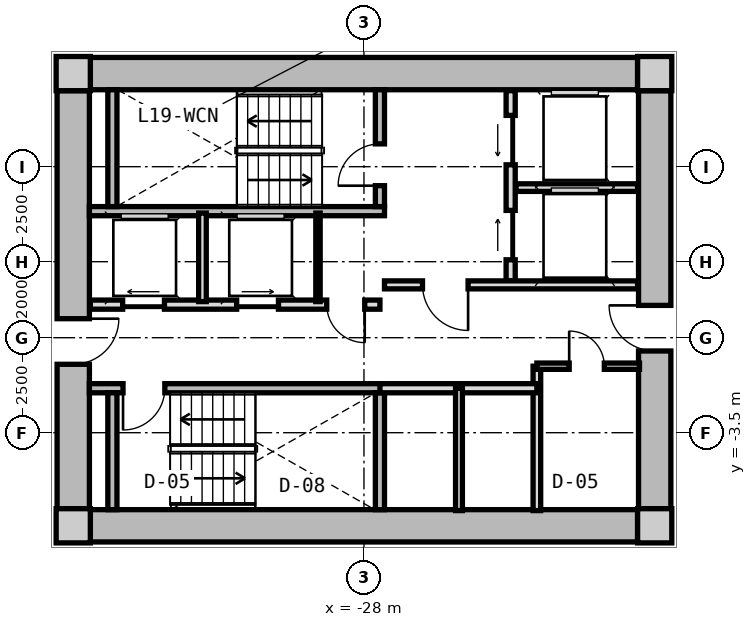
"""IFC4 building model, lengths in metres.
Left out: names, types, materials, properties, quantities, classifications, styles, units other than length and angle.
Written with IfcOpenShell. Run it as: python <this file> out.ifc"""

import sys

from ifc_helpers import new_model, si_unit, direction, frame, frame_2d, origin, origin_2d, place, context, subcontext, project, spatial, rectangle, extrude, source, transform, mapped, element, fill, save


model = new_model("IFC4")
c1 = context("Model", 3, precision=1e-05, world=origin(), true_north=direction((0.0, 1.0)))
c2 = subcontext(c1, "Body", "Model", "MODEL_VIEW")
j1 = project(units=[si_unit("LENGTHUNIT", "METRE"), si_unit("PLANEANGLEUNIT", "RADIAN")], contexts=[c1])
p1 = place(None, origin())
s1 = spatial("IfcSite", under=j1, at=p1, CompositionType="ELEMENT")
p2 = place(p1, origin())
s2 = spatial("IfcBuilding", under=s1, at=p2, CompositionType="ELEMENT")
p3 = place(p2, frame((0.0, 0.0, 64.3)))
s3 = spatial("IfcBuildingStorey", under=s2, at=p3, CompositionType="ELEMENT", Elevation=64.3)
m1 = source(origin(), c2, "Body", "SweptSolid", [
    extrude(rectangle(XDim=0.9, YDim=0.9, at=origin_2d()), origin(), (0.0, 0.0, 1.0), 3.05),
])
for number, where, z_axis, x_axis in (
    (1, (-35.65, -5.95, 0.0), (0.0, 0.0, 1.0), (1.0, 0.0, 0.0)),
    (2, (-20.35, -5.95, 0.0), (0.0, 0.0, 1.0), (1.0, 0.0, 0.0)),
    (3, (-20.35, 5.95, 0.0), (0.0, 0.0, 1.0), (1.0, 0.0, 0.0)),
    (4, (-35.65, 5.95, 0.0), (0.0, 0.0, 1.0), (1.0, 0.0, 0.0)),
):
    element("IfcColumn", number, at=place(p3, frame(where, z_axis=z_axis, x_axis=x_axis)), inside=s3, PredefinedType="COLUMN", context=c2, shape_type="MappedRepresentation", body=[
        mapped(m1, transform((0.0, 0.0, 0.0), x_axis=(1.0, 0.0, 0.0), y_axis=(0.0, 1.0, 0.0), z_axis=(0.0, 0.0, 1.0), scale=1.0)),
    ])
m2 = source(origin(), c2, "Body", "SweptSolid", [
    extrude(rectangle(XDim=14.4, YDim=0.85, at=frame_2d((7.2, 0.0))), origin(), (0.0, 0.0, 1.0), 2.79),
])
for number, where, z_axis, x_axis in (
    (5, (-35.2, 5.95, 0.0), (0.0, 0.0, 1.0), (1.0, 0.0, 0.0)),
    (6, (-20.8, -5.95, 0.0), (0.0, 0.0, 1.0), (-1.0, 0.0, 0.0)),
):
    element("IfcWall", number, at=place(p3, frame(where, z_axis=z_axis, x_axis=x_axis)), inside=s3, PredefinedType="SHEAR", context=c2, shape_type="MappedRepresentation", body=[
        mapped(m2, transform((0.0, 0.0, 0.0), x_axis=(1.0, 0.0, 0.0), y_axis=(0.0, 1.0, 0.0), z_axis=(0.0, 0.0, 1.0), scale=1.0)),
    ])
m3 = source(origin(), c2, "Body", "SweptSolid", [
    extrude(rectangle(XDim=11.0, YDim=0.85, at=frame_2d((5.5, 0.0))), origin(), (0.0, 0.0, 1.0), 2.79),
])
p4 = place(p3, frame((-35.65, -5.5, 0.0), z_axis=(0.0, 0.0, 1.0), x_axis=(0.0, 1.0, 0.0)))
e7 = element("IfcWall", 7, at=p4, inside=s3, PredefinedType="SHEAR", context=c2, shape_type="MappedRepresentation", body=[
    mapped(m3, transform((0.0, 0.0, 0.0), x_axis=(1.0, 0.0, 0.0), y_axis=(0.0, 1.0, 0.0), z_axis=(0.0, 0.0, 1.0), scale=1.0)),
])
p5 = place(p4, frame((3.8, 0.0, 0.0)))
e8 = element("IfcOpeningElement", 8, at=p5, cuts=e7, PredefinedType="OPENING", context=c2, shape_type="SweptSolid", body=[
    extrude(rectangle(XDim=1.2, YDim=2.15, at=frame_2d((0.6, 1.075))), frame((0.0, 0.435, 0.0), z_axis=(0.0, -1.0, 0.0), x_axis=(1.0, 0.0, 0.0)), (0.0, 0.0, 1.0), 0.87),
])
p6 = place(p3, frame((-20.35, 5.5, 0.0), z_axis=(0.0, 0.0, 1.0), x_axis=(0.0, -1.0, 0.0)))
e9 = element("IfcWall", 9, at=p6, inside=s3, PredefinedType="SHEAR", context=c2, shape_type="MappedRepresentation", body=[
    mapped(m3, transform((0.0, 0.0, 0.0), x_axis=(1.0, 0.0, 0.0), y_axis=(0.0, 1.0, 0.0), z_axis=(0.0, 0.0, 1.0), scale=1.0)),
])
p7 = place(p6, frame((5.65, 0.0, 0.0)))
e10 = element("IfcOpeningElement", 10, at=p7, cuts=e9, PredefinedType="OPENING", context=c2, shape_type="SweptSolid", body=[
    extrude(rectangle(XDim=1.2, YDim=2.15, at=frame_2d((0.6, 1.075))), frame((0.0, 0.435, 0.0), z_axis=(0.0, -1.0, 0.0), x_axis=(1.0, 0.0, 0.0)), (0.0, 0.0, 1.0), 0.87),
])
m4 = source(origin(), c2, "Body", "SweptSolid", [
    extrude(rectangle(XDim=7.765, YDim=0.24, at=frame_2d((3.883, 0.0))), origin(), (0.0, 0.0, 1.0), 2.79),
])
p8 = place(p3, frame((-35.225, 2.33, 0.0), z_axis=(0.0, 0.0, 1.0), x_axis=(1.0, 0.0, 0.0)))
e11 = element("IfcWall", 11, at=p8, inside=s3, PredefinedType="PARTITIONING", context=c2, shape_type="MappedRepresentation", body=[
    mapped(m4, transform((0.0, 0.0, 0.0), x_axis=(1.0, 0.0, 0.0), y_axis=(0.0, 1.0, 0.0), z_axis=(0.0, 0.0, 1.0), scale=1.0)),
])
m5 = source(origin(), c2, "Body", "SweptSolid", [
    extrude(rectangle(XDim=3.075, YDim=0.24, at=frame_2d((1.538, 0.0))), origin(), (0.0, 0.0, 1.0), 2.79),
])
p9 = place(p3, frame((-34.62, 2.45, 0.0), z_axis=(0.0, 0.0, 1.0), x_axis=(0.0, 1.0, 0.0)))
e12 = element("IfcWall", 12, at=p9, inside=s3, PredefinedType="PARTITIONING", context=c2, shape_type="MappedRepresentation", body=[
    mapped(m5, transform((0.0, 0.0, 0.0), x_axis=(1.0, 0.0, 0.0), y_axis=(0.0, 1.0, 0.0), z_axis=(0.0, 0.0, 1.0), scale=1.0)),
])
p10 = place(p3, frame((-27.58, 2.45, 0.0), z_axis=(0.0, 0.0, 1.0), x_axis=(0.0, 1.0, 0.0)))
e13 = element("IfcWall", 13, at=p10, inside=s3, PredefinedType="PARTITIONING", context=c2, shape_type="MappedRepresentation", body=[
    mapped(m5, transform((0.0, 0.0, 0.0), x_axis=(1.0, 0.0, 0.0), y_axis=(0.0, 1.0, 0.0), z_axis=(0.0, 0.0, 1.0), scale=1.0)),
])
p11 = place(p10, frame((0.55, 0.0, 0.0)))
e14 = element("IfcOpeningElement", 14, at=p11, cuts=e13, PredefinedType="OPENING", context=c2, shape_type="SweptSolid", body=[
    extrude(rectangle(XDim=1.1, YDim=2.15, at=frame_2d((0.55, 1.075))), frame((0.0, 0.13, 0.0), z_axis=(0.0, -1.0, 0.0), x_axis=(1.0, 0.0, 0.0)), (0.0, 0.0, 1.0), 0.26),
])
p12 = place(p3, frame((-35.225, -2.33, 0.0), z_axis=(0.0, 0.0, 1.0), x_axis=(1.0, 0.0, 0.0)))
e15 = element("IfcWall", 15, at=p12, inside=s3, PredefinedType="PARTITIONING", context=c2, shape_type="MappedRepresentation", body=[
    mapped(m4, transform((0.0, 0.0, 0.0), x_axis=(1.0, 0.0, 0.0), y_axis=(0.0, 1.0, 0.0), z_axis=(0.0, 0.0, 1.0), scale=1.0)),
])
p13 = place(p12, frame((0.885, 0.0, 0.0)))
e16 = element("IfcOpeningElement", 16, at=p13, cuts=e15, PredefinedType="OPENING", context=c2, shape_type="SweptSolid", body=[
    extrude(rectangle(XDim=1.1, YDim=2.15, at=frame_2d((0.55, 1.075))), frame((0.0, 0.13, 0.0), z_axis=(0.0, -1.0, 0.0), x_axis=(1.0, 0.0, 0.0)), (0.0, 0.0, 1.0), 0.26),
])
for number, where, z_axis, x_axis in (
    (17, (-34.62, -5.525, 0.0), (0.0, 0.0, 1.0), (0.0, 1.0, 0.0)),
    (18, (-27.58, -5.525, 0.0), (0.0, 0.0, 1.0), (0.0, 1.0, 0.0)),
):
    element("IfcWall", number, at=place(p3, frame(where, z_axis=z_axis, x_axis=x_axis)), inside=s3, PredefinedType="PARTITIONING", context=c2, shape_type="MappedRepresentation", body=[
        mapped(m5, transform((0.0, 0.0, 0.0), x_axis=(1.0, 0.0, 0.0), y_axis=(0.0, 1.0, 0.0), z_axis=(0.0, 0.0, 1.0), scale=1.0)),
    ])
m6 = source(origin(), c2, "Body", "SweptSolid", [
    extrude(rectangle(XDim=5.0, YDim=0.24, at=frame_2d((2.5, 0.0))), origin(), (0.0, 0.0, 1.0), 2.775),
])
p14 = place(p3, frame((-24.14, 0.5, 0.0), z_axis=(0.0, 0.0, 1.0), x_axis=(0.0, 1.0, 0.0)))
e19 = element("IfcWall", 19, at=p14, inside=s3, PredefinedType="PARTITIONING", context=c2, shape_type="MappedRepresentation", body=[
    mapped(m6, transform((0.0, 0.0, 0.0), x_axis=(1.0, 0.0, 0.0), y_axis=(0.0, 1.0, 0.0), z_axis=(0.0, 0.0, 1.0), scale=1.0)),
])
p15 = place(p14, frame((3.05, 0.0, 0.0)))
e20 = element("IfcOpeningElement", 20, at=p15, cuts=e19, PredefinedType="OPENING", context=c2, shape_type="SweptSolid", body=[
    extrude(rectangle(XDim=1.3, YDim=2.2, at=frame_2d((0.65, 1.1))), frame((0.0, 0.13, 0.0), z_axis=(0.0, -1.0, 0.0), x_axis=(1.0, 0.0, 0.0)), (0.0, 0.0, 1.0), 0.26),
])
p16 = place(p14, frame((0.55, 0.0, 0.0)))
e21 = element("IfcOpeningElement", 21, at=p16, cuts=e19, PredefinedType="OPENING", context=c2, shape_type="SweptSolid", body=[
    extrude(rectangle(XDim=1.3, YDim=2.2, at=frame_2d((0.65, 1.1))), frame((0.0, 0.13, 0.0), z_axis=(0.0, -1.0, 0.0), x_axis=(1.0, 0.0, 0.0)), (0.0, 0.0, 1.0), 0.26),
])
m7 = source(origin(), c2, "Body", "SweptSolid", [
    extrude(rectangle(XDim=3.2, YDim=0.2, at=frame_2d((1.6, 0.0))), origin(), (0.0, 0.0, 1.0), 2.775),
])
p17 = place(p3, frame((-24.0, 2.95, 0.0), z_axis=(0.0, 0.0, 1.0), x_axis=(1.0, 0.0, 0.0)))
e22 = element("IfcWall", 22, at=p17, inside=s3, PredefinedType="PARTITIONING", context=c2, shape_type="MappedRepresentation", body=[
    mapped(m7, transform((0.0, 0.0, 0.0), x_axis=(1.0, 0.0, 0.0), y_axis=(0.0, 1.0, 0.0), z_axis=(0.0, 0.0, 1.0), scale=1.0)),
])
m8 = source(origin(), c2, "Body", "SweptSolid", [
    extrude(rectangle(XDim=6.66, YDim=0.21, at=frame_2d((3.33, 0.0))), origin(), (0.0, 0.0, 1.0), 2.775),
])
p18 = place(p3, frame((-27.46, 0.39, 0.0), z_axis=(0.0, 0.0, 1.0), x_axis=(1.0, 0.0, 0.0)))
e23 = element("IfcWall", 23, at=p18, inside=s3, PredefinedType="PARTITIONING", context=c2, shape_type="MappedRepresentation", body=[
    mapped(m8, transform((0.0, 0.0, 0.0), x_axis=(1.0, 0.0, 0.0), y_axis=(0.0, 1.0, 0.0), z_axis=(0.0, 0.0, 1.0), scale=1.0)),
])
p19 = place(p18, frame((1.0, 0.0, 0.0)))
e24 = element("IfcOpeningElement", 24, at=p19, cuts=e23, PredefinedType="OPENING", context=c2, shape_type="SweptSolid", body=[
    extrude(rectangle(XDim=1.2, YDim=2.15, at=frame_2d((0.6, 1.075))), frame((0.0, 0.115, 0.0), z_axis=(0.0, -1.0, 0.0), x_axis=(1.0, 0.0, 0.0)), (0.0, 0.0, 1.0), 0.23),
])
m9 = source(origin(), c2, "Body", "SweptSolid", [
    extrude(rectangle(XDim=7.62, YDim=0.24, at=frame_2d((3.81, 0.0))), origin(), (0.0, 0.0, 1.0), 2.775),
])
p20 = place(p3, frame((-35.2, -0.13, 0.0), z_axis=(0.0, 0.0, 1.0), x_axis=(1.0, 0.0, 0.0)))
e25 = element("IfcWall", 25, at=p20, inside=s3, PredefinedType="PARTITIONING", context=c2, shape_type="MappedRepresentation", body=[
    mapped(m9, transform((0.0, 0.0, 0.0), x_axis=(1.0, 0.0, 0.0), y_axis=(0.0, 1.0, 0.0), z_axis=(0.0, 0.0, 1.0), scale=1.0)),
])
p21 = place(p20, frame((6.22, 0.0, 0.0)))
e26 = element("IfcOpeningElement", 26, at=p21, cuts=e25, PredefinedType="OPENING", context=c2, shape_type="SweptSolid", body=[
    extrude(rectangle(XDim=1.0, YDim=2.1, at=frame_2d((0.5, 1.05))), frame((0.0, 0.13, 0.0), z_axis=(0.0, -1.0, 0.0), x_axis=(1.0, 0.0, 0.0)), (0.0, 0.0, 1.0), 0.26),
])
p22 = place(p20, frame((0.85, 0.0, 0.0)))
e27 = element("IfcOpeningElement", 27, at=p22, cuts=e25, PredefinedType="OPENING", context=c2, shape_type="SweptSolid", body=[
    extrude(rectangle(XDim=1.1, YDim=2.2, at=frame_2d((0.55, 1.1))), frame((0.0, 0.13, 0.0), z_axis=(0.0, -1.0, 0.0), x_axis=(1.0, 0.0, 0.0)), (0.0, 0.0, 1.0), 0.26),
])
p23 = place(p20, frame((3.85, 0.0, 0.0)))
e28 = element("IfcOpeningElement", 28, at=p23, cuts=e25, PredefinedType="OPENING", context=c2, shape_type="SweptSolid", body=[
    extrude(rectangle(XDim=1.1, YDim=2.2, at=frame_2d((0.55, 1.1))), frame((0.0, 0.13, 0.0), z_axis=(0.0, -1.0, 0.0), x_axis=(1.0, 0.0, 0.0)), (0.0, 0.0, 1.0), 0.26),
])
m10 = source(origin(), c2, "Body", "SweptSolid", [
    extrude(rectangle(XDim=2.33, YDim=0.115, at=frame_2d((1.165, 0.0))), origin(), (0.0, 0.0, 1.0), 2.775),
])
p24 = place(p3, frame((-29.21, -0.05, 0.0), z_axis=(0.0, 0.0, 1.0), x_axis=(0.0, 1.0, 0.0)))
e29 = element("IfcWall", 29, at=p24, inside=s3, PredefinedType="PARTITIONING", context=c2, shape_type="MappedRepresentation", body=[
    mapped(m10, transform((0.0, 0.0, 0.0), x_axis=(1.0, 0.0, 0.0), y_axis=(0.0, 1.0, 0.0), z_axis=(0.0, 0.0, 1.0), scale=1.0)),
])
m11 = source(origin(), c2, "Body", "SweptSolid", [
    extrude(rectangle(XDim=2.33, YDim=0.2, at=frame_2d((1.165, 0.0))), origin(), (0.0, 0.0, 1.0), 2.775),
])
p25 = place(p3, frame((-32.25, -0.05, 0.0), z_axis=(0.0, 0.0, 1.0), x_axis=(0.0, 1.0, 0.0)))
e30 = element("IfcWall", 30, at=p25, inside=s3, PredefinedType="PARTITIONING", context=c2, shape_type="MappedRepresentation", body=[
    mapped(m11, transform((0.0, 0.0, 0.0), x_axis=(1.0, 0.0, 0.0), y_axis=(0.0, 1.0, 0.0), z_axis=(0.0, 0.0, 1.0), scale=1.0)),
])
m12 = source(origin(), c2, "Body", "SweptSolid", [
    extrude(rectangle(XDim=3.8, YDim=0.2, at=frame_2d((1.9, 0.0))), origin(), (0.0, 0.0, 1.0), 2.775),
])
p26 = place(p3, frame((-23.45, -5.55, 0.0), z_axis=(0.0, 0.0, 1.0), x_axis=(0.0, 1.0, 0.0)))
e31 = element("IfcWall", 31, at=p26, inside=s3, PredefinedType="PARTITIONING", context=c2, shape_type="MappedRepresentation", body=[
    mapped(m12, transform((0.0, 0.0, 0.0), x_axis=(1.0, 0.0, 0.0), y_axis=(0.0, 1.0, 0.0), z_axis=(0.0, 0.0, 1.0), scale=1.0)),
])
m13 = source(origin(), c2, "Body", "SweptSolid", [
    extrude(rectangle(XDim=4.13, YDim=0.24, at=frame_2d((2.065, 0.0))), origin(), (0.0, 0.0, 1.0), 2.775),
])
p27 = place(p3, frame((-27.58, -2.33, 0.0), z_axis=(0.0, 0.0, 1.0), x_axis=(1.0, 0.0, 0.0)))
e32 = element("IfcWall", 32, at=p27, inside=s3, PredefinedType="PARTITIONING", context=c2, shape_type="MappedRepresentation", body=[
    mapped(m13, transform((0.0, 0.0, 0.0), x_axis=(1.0, 0.0, 0.0), y_axis=(0.0, 1.0, 0.0), z_axis=(0.0, 0.0, 1.0), scale=1.0)),
])
m14 = source(origin(), c2, "Body", "SweptSolid", [
    extrude(rectangle(XDim=3.22, YDim=0.18, at=frame_2d((1.61, 0.0))), origin(), (0.0, 0.0, 1.0), 2.775),
])
p28 = place(p3, frame((-25.5, -5.55, 0.0), z_axis=(0.0, 0.0, 1.0), x_axis=(0.0, 1.0, 0.0)))
e33 = element("IfcWall", 33, at=p28, inside=s3, PredefinedType="PARTITIONING", context=c2, shape_type="MappedRepresentation", body=[
    mapped(m14, transform((0.0, 0.0, 0.0), x_axis=(1.0, 0.0, 0.0), y_axis=(0.0, 1.0, 0.0), z_axis=(0.0, 0.0, 1.0), scale=1.0)),
])
m15 = source(origin(), c2, "Body", "SweptSolid", [
    extrude(rectangle(XDim=2.7, YDim=0.165, at=frame_2d((1.35, 0.0))), origin(), (0.0, 0.0, 1.0), 2.775),
])
p29 = place(p3, frame((-23.45, -1.75, 0.0), z_axis=(0.0, 0.0, 1.0), x_axis=(1.0, 0.0, 0.0)))
e34 = element("IfcWall", 34, at=p29, inside=s3, PredefinedType="PARTITIONING", context=c2, shape_type="MappedRepresentation", body=[
    mapped(m15, transform((0.0, 0.0, 0.0), x_axis=(1.0, 0.0, 0.0), y_axis=(0.0, 1.0, 0.0), z_axis=(0.0, 0.0, 1.0), scale=1.0)),
])
p30 = place(p29, frame((0.85, 0.0, 0.0)))
e35 = element("IfcOpeningElement", 35, at=p30, cuts=e34, PredefinedType="OPENING", context=c2, shape_type="SweptSolid", body=[
    extrude(rectangle(XDim=0.925, YDim=2.1, at=frame_2d((0.462, 1.05))), frame((0.0, 0.093, 0.0), z_axis=(0.0, -1.0, 0.0), x_axis=(1.0, 0.0, 0.0)), (0.0, 0.0, 1.0), 0.185),
])
m16 = source(origin(), c2, "Body", "SweptSolid", [
    extrude(rectangle(XDim=1.1, YDim=2.15, at=frame_2d((0.55, 1.075))), frame((0.0, 0.025, 0.0), z_axis=(0.0, -1.0, 0.0), x_axis=(1.0, 0.0, 0.0)), (0.0, 0.0, 1.0), 0.05),
])
p31 = place(p11, origin())
e36 = element("IfcDoor", 36, at=p31, inside=s3, OperationType="SINGLE_SWING_LEFT", PredefinedType="DOOR", context=c2, shape_type="MappedRepresentation", body=[
    mapped(m16, transform((0.0, 0.0, 0.0), x_axis=(1.0, 0.0, 0.0), y_axis=(0.0, 1.0, 0.0), z_axis=(0.0, 0.0, 1.0), scale=1.0)),
])
fill(e14, e36)
p32 = place(p13, frame((1.1, 0.0, 0.0), z_axis=(0.0, 0.0, 1.0), x_axis=(-1.0, 0.0, 0.0)))
e37 = element("IfcDoor", 37, at=p32, inside=s3, OperationType="SINGLE_SWING_RIGHT", PredefinedType="DOOR", context=c2, shape_type="MappedRepresentation", body=[
    mapped(m16, transform((0.0, 0.0, 0.0), x_axis=(1.0, 0.0, 0.0), y_axis=(0.0, 1.0, 0.0), z_axis=(0.0, 0.0, 1.0), scale=1.0)),
])
fill(e16, e37)
m17 = source(origin(), c2, "Body", "SweptSolid", [
    extrude(rectangle(XDim=1.3, YDim=2.2, at=frame_2d((0.65, 1.1))), frame((0.0, 0.025, 0.0), z_axis=(0.0, -1.0, 0.0), x_axis=(1.0, 0.0, 0.0)), (0.0, 0.0, 1.0), 0.05),
])
p33 = place(p15, origin())
e38 = element("IfcDoor", 38, at=p33, inside=s3, OperationType="SLIDING_TO_LEFT", PredefinedType="DOOR", context=c2, shape_type="MappedRepresentation", body=[
    mapped(m17, transform((0.0, 0.0, 0.0), x_axis=(1.0, 0.0, 0.0), y_axis=(0.0, 1.0, 0.0), z_axis=(0.0, 0.0, 1.0), scale=1.0)),
])
fill(e20, e38)
p34 = place(p16, origin())
e39 = element("IfcDoor", 39, at=p34, inside=s3, OperationType="SLIDING_TO_RIGHT", PredefinedType="DOOR", context=c2, shape_type="MappedRepresentation", body=[
    mapped(m17, transform((0.0, 0.0, 0.0), x_axis=(1.0, 0.0, 0.0), y_axis=(0.0, 1.0, 0.0), z_axis=(0.0, 0.0, 1.0), scale=1.0)),
])
fill(e21, e39)
m18 = source(origin(), c2, "Body", "SweptSolid", [
    extrude(rectangle(XDim=1.2, YDim=2.15, at=frame_2d((0.6, 1.075))), frame((0.0, 0.025, 0.0), z_axis=(0.0, -1.0, 0.0), x_axis=(1.0, 0.0, 0.0)), (0.0, 0.0, 1.0), 0.05),
])
p35 = place(p19, frame((1.2, 0.0, 0.0), z_axis=(0.0, 0.0, 1.0), x_axis=(-1.0, 0.0, 0.0)))
e40 = element("IfcDoor", 40, at=p35, inside=s3, OperationType="SINGLE_SWING_LEFT", PredefinedType="DOOR", context=c2, shape_type="MappedRepresentation", body=[
    mapped(m18, transform((0.0, 0.0, 0.0), x_axis=(1.0, 0.0, 0.0), y_axis=(0.0, 1.0, 0.0), z_axis=(0.0, 0.0, 1.0), scale=1.0)),
])
fill(e24, e40)
p36 = place(p5, frame((1.2, 0.0, 0.0), z_axis=(0.0, 0.0, 1.0), x_axis=(-1.0, 0.0, 0.0)))
e41 = element("IfcDoor", 41, at=p36, inside=s3, OperationType="SINGLE_SWING_LEFT", PredefinedType="DOOR", context=c2, shape_type="MappedRepresentation", body=[
    mapped(m18, transform((0.0, 0.0, 0.0), x_axis=(1.0, 0.0, 0.0), y_axis=(0.0, 1.0, 0.0), z_axis=(0.0, 0.0, 1.0), scale=1.0)),
])
fill(e8, e41)
p37 = place(p7, frame((1.2, 0.0, 0.0), z_axis=(0.0, 0.0, 1.0), x_axis=(-1.0, 0.0, 0.0)))
e42 = element("IfcDoor", 42, at=p37, inside=s3, OperationType="SINGLE_SWING_RIGHT", PredefinedType="DOOR", context=c2, shape_type="MappedRepresentation", body=[
    mapped(m18, transform((0.0, 0.0, 0.0), x_axis=(1.0, 0.0, 0.0), y_axis=(0.0, 1.0, 0.0), z_axis=(0.0, 0.0, 1.0), scale=1.0)),
])
fill(e10, e42)
m19 = source(origin(), c2, "Body", "SweptSolid", [
    extrude(rectangle(XDim=1.0, YDim=2.1, at=frame_2d((0.5, 1.05))), frame((0.0, 0.025, 0.0), z_axis=(0.0, -1.0, 0.0), x_axis=(1.0, 0.0, 0.0)), (0.0, 0.0, 1.0), 0.05),
])
p38 = place(p21, frame((1.0, 0.0, 0.0), z_axis=(0.0, 0.0, 1.0), x_axis=(-1.0, 0.0, 0.0)))
e43 = element("IfcDoor", 43, at=p38, inside=s3, OperationType="SINGLE_SWING_LEFT", PredefinedType="DOOR", context=c2, shape_type="MappedRepresentation", body=[
    mapped(m19, transform((0.0, 0.0, 0.0), x_axis=(1.0, 0.0, 0.0), y_axis=(0.0, 1.0, 0.0), z_axis=(0.0, 0.0, 1.0), scale=1.0)),
])
fill(e26, e43)
m20 = source(origin(), c2, "Body", "SweptSolid", [
    extrude(rectangle(XDim=1.1, YDim=2.2, at=frame_2d((0.55, 1.1))), frame((0.0, 0.025, 0.0), z_axis=(0.0, -1.0, 0.0), x_axis=(1.0, 0.0, 0.0)), (0.0, 0.0, 1.0), 0.05),
])
p39 = place(p22, origin())
e44 = element("IfcDoor", 44, at=p39, inside=s3, OperationType="SLIDING_TO_LEFT", PredefinedType="DOOR", context=c2, shape_type="MappedRepresentation", body=[
    mapped(m20, transform((0.0, 0.0, 0.0), x_axis=(1.0, 0.0, 0.0), y_axis=(0.0, 1.0, 0.0), z_axis=(0.0, 0.0, 1.0), scale=1.0)),
])
fill(e27, e44)
p40 = place(p23, origin())
e45 = element("IfcDoor", 45, at=p40, inside=s3, OperationType="SLIDING_TO_RIGHT", PredefinedType="DOOR", context=c2, shape_type="MappedRepresentation", body=[
    mapped(m20, transform((0.0, 0.0, 0.0), x_axis=(1.0, 0.0, 0.0), y_axis=(0.0, 1.0, 0.0), z_axis=(0.0, 0.0, 1.0), scale=1.0)),
])
fill(e28, e45)
m21 = source(origin(), c2, "Body", "SweptSolid", [
    extrude(rectangle(XDim=0.925, YDim=2.1, at=frame_2d((0.462, 1.05))), frame((0.0, 0.025, 0.0), z_axis=(0.0, -1.0, 0.0), x_axis=(1.0, 0.0, 0.0)), (0.0, 0.0, 1.0), 0.05),
])
p41 = place(p30, origin())
e46 = element("IfcDoor", 46, at=p41, inside=s3, OperationType="SINGLE_SWING_LEFT", PredefinedType="DOOR", context=c2, shape_type="MappedRepresentation", body=[
    mapped(m21, transform((0.0, 0.0, 0.0), x_axis=(1.0, 0.0, 0.0), y_axis=(0.0, 1.0, 0.0), z_axis=(0.0, 0.0, 1.0), scale=1.0)),
])
fill(e35, e46)
save(model, sys.argv[1])
